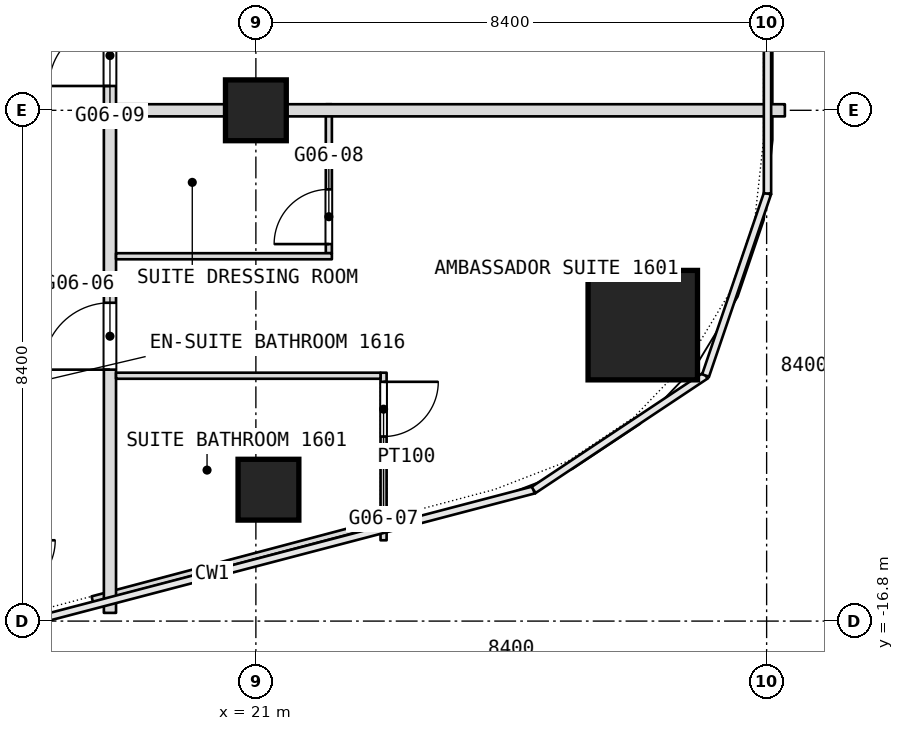
"""IFC4 building model, lengths in metres.
Left out: names, types, materials, properties, quantities, classifications, styles, units other than length and angle.
Written with IfcOpenShell. Run it as: python <this file> out.ifc"""

import sys

from ifc_helpers import new_model, si_unit, direction, frame, frame_2d, origin, origin_2d, place, context, subcontext, project, spatial, rectangle, extrude, element, fill, save


model = new_model("IFC4")
c1 = context("Model", 3, precision=1e-05, world=origin(), true_north=direction((0.0, 1.0)))
c2 = subcontext(c1, "Body", "Model", "MODEL_VIEW")
j1 = project(units=[si_unit("LENGTHUNIT", "METRE"), si_unit("PLANEANGLEUNIT", "RADIAN")], contexts=[c1])
p1 = place(None, origin())
s1 = spatial("IfcSite", under=j1, at=p1, CompositionType="ELEMENT")
p2 = place(p1, origin())
s2 = spatial("IfcBuilding", under=s1, at=p2, CompositionType="ELEMENT")
p3 = place(p2, frame((0.0, 0.0, 72.5)))
s3 = spatial("IfcBuildingStorey", under=s2, at=p3, CompositionType="ELEMENT", Elevation=72.5)
p4 = place(p3, frame((27.363, -11.933, 0.0), z_axis=(0.0, 0.0, 1.0), x_axis=(1.0, 0.0, 0.0)))
e1 = element("IfcColumn", 1, at=p4, inside=s3, PredefinedType="COLUMN", context=c2, shape_type="SweptSolid", body=[
    extrude(rectangle(XDim=1.8, YDim=1.8, at=origin_2d()), origin(), (0.0, 0.0, 1.0), 3.6),
])
for number, where, z_axis, x_axis in (
    (2, (21.0, -8.4, 0.0), (0.0, 0.0, 1.0), (1.0, 0.0, 0.0)),
    (3, (21.207, -14.639, 0.0), (0.0, 0.0, 1.0), (1.0, 0.0, 0.0)),
):
    element("IfcColumn", number, at=place(p3, frame(where, z_axis=z_axis, x_axis=x_axis)), inside=s3, PredefinedType="COLUMN", context=c2, shape_type="SweptSolid", body=[
        extrude(rectangle(XDim=1.0, YDim=1.0, at=origin_2d()), origin(), (0.0, 0.0, 1.0), 3.6),
    ])
p5 = place(p3, frame((23.1, -15.471, 0.0), z_axis=(0.0, 0.0, 1.0), x_axis=(0.0, 1.0, 0.0)))
e4 = element("IfcWall", 4, at=p5, inside=s3, PredefinedType="PARTITIONING", context=c2, shape_type="SweptSolid", body=[
    extrude(rectangle(XDim=2.756, YDim=0.1, at=frame_2d((1.378, 0.0))), origin(), (0.0, 0.0, 1.0), 3.34),
])
p6 = place(p5, frame((1.706, 0.0, 0.0)))
e5 = element("IfcOpeningElement", 5, at=p6, cuts=e4, PredefinedType="OPENING", context=c2, shape_type="SweptSolid", body=[
    extrude(rectangle(XDim=0.9, YDim=2.1, at=frame_2d((0.45, 1.05))), frame((0.0, 0.05, 0.0), z_axis=(0.0, -1.0, 0.0), x_axis=(1.0, 0.0, 0.0)), (0.0, 0.0, 1.0), 0.1),
])
p7 = place(p3, frame((22.2, -10.75, 0.0), z_axis=(0.0, 0.0, 1.0), x_axis=(0.0, 1.0, 0.0)))
e6 = element("IfcWall", 6, at=p7, inside=s3, PredefinedType="PARTITIONING", context=c2, shape_type="SweptSolid", body=[
    extrude(rectangle(XDim=2.45, YDim=0.1, at=frame_2d((1.225, 0.0))), origin(), (0.0, 0.0, 1.0), 3.34),
])
p8 = place(p7, frame((0.15, 0.0, 0.0)))
e7 = element("IfcOpeningElement", 7, at=p8, cuts=e6, PredefinedType="OPENING", context=c2, shape_type="SweptSolid", body=[
    extrude(rectangle(XDim=0.9, YDim=2.1, at=frame_2d((0.45, 1.05))), frame((0.0, 0.05, 0.0), z_axis=(0.0, -1.0, 0.0), x_axis=(1.0, 0.0, 0.0)), (0.0, 0.0, 1.0), 0.1),
])
p9 = place(p3, frame((18.31, -16.442, 0.0), z_axis=(0.0, 0.0, 1.0), x_axis=(0.966552628131, 0.256468354876, 0.0)))
e8 = element("IfcWall", 8, at=p9, inside=s3, PredefinedType="PARTITIONING", context=c2, shape_type="SweptSolid", body=[
    extrude(rectangle(XDim=5.256, YDim=0.1, at=frame_2d((2.628, 0.0))), origin(), (0.0, 0.0, 1.0), 3.34),
])
p10 = place(p3, frame((18.6, -16.665, 0.0), z_axis=(0.0, 0.0, 1.0), x_axis=(0.0, 1.0, 0.0)))
e9 = element("IfcWall", 9, at=p10, inside=s3, PredefinedType="PARTITIONING", context=c2, shape_type="SweptSolid", body=[
    extrude(rectangle(XDim=50.205, YDim=0.2, at=frame_2d((25.103, 0.0))), origin(), (0.0, 0.0, 1.0), 3.34),
])
p11 = place(p10, frame((4.0, 0.0, 0.0)))
e10 = element("IfcOpeningElement", 10, at=p11, cuts=e9, PredefinedType="OPENING", context=c2, shape_type="SweptSolid", body=[
    extrude(rectangle(XDim=1.1, YDim=2.1, at=frame_2d((0.55, 1.05))), frame((0.0, 0.1, 0.0), z_axis=(0.0, -1.0, 0.0), x_axis=(1.0, 0.0, 0.0)), (0.0, 0.0, 1.0), 0.2),
])
p12 = place(p10, frame((8.665, 0.0, 0.0)))
e11 = element("IfcOpeningElement", 11, at=p12, cuts=e9, PredefinedType="OPENING", context=c2, shape_type="SweptSolid", body=[
    extrude(rectangle(XDim=1.0, YDim=2.1, at=frame_2d((0.5, 1.05))), frame((0.0, 0.1, 0.0), z_axis=(0.0, -1.0, 0.0), x_axis=(1.0, 0.0, 0.0)), (0.0, 0.0, 1.0), 0.2),
])
p13 = place(p10, frame((15.265, 0.0, 0.0)))
e12 = element("IfcOpeningElement", 12, at=p13, cuts=e9, PredefinedType="OPENING", context=c2, shape_type="SweptSolid", body=[
    extrude(rectangle(XDim=1.0, YDim=2.1, at=frame_2d((0.5, 1.05))), frame((0.0, 0.1, 0.0), z_axis=(0.0, -1.0, 0.0), x_axis=(1.0, 0.0, 0.0)), (0.0, 0.0, 1.0), 0.2),
])
p14 = place(p10, frame((19.965, 0.0, 0.0)))
e13 = element("IfcOpeningElement", 13, at=p14, cuts=e9, PredefinedType="OPENING", context=c2, shape_type="SweptSolid", body=[
    extrude(rectangle(XDim=1.8, YDim=2.1, at=frame_2d((0.9, 1.05))), frame((0.0, 0.1, 0.0), z_axis=(0.0, -1.0, 0.0), x_axis=(1.0, 0.0, 0.0)), (0.0, 0.0, 1.0), 0.2),
])
p15 = place(p10, frame((28.665, 0.0, 0.0)))
e14 = element("IfcOpeningElement", 14, at=p15, cuts=e9, PredefinedType="OPENING", context=c2, shape_type="SweptSolid", body=[
    extrude(rectangle(XDim=1.1, YDim=2.1, at=frame_2d((0.55, 1.05))), frame((0.0, 0.1, 0.0), z_axis=(0.0, -1.0, 0.0), x_axis=(1.0, 0.0, 0.0)), (0.0, 0.0, 1.0), 0.2),
])
p16 = place(p10, frame((39.215, 0.0, 0.0)))
e15 = element("IfcOpeningElement", 15, at=p16, cuts=e9, PredefinedType="OPENING", context=c2, shape_type="SweptSolid", body=[
    extrude(rectangle(XDim=1.1, YDim=2.1, at=frame_2d((0.55, 1.05))), frame((0.0, 0.1, 0.0), z_axis=(0.0, -1.0, 0.0), x_axis=(1.0, 0.0, 0.0)), (0.0, 0.0, 1.0), 0.2),
])
p17 = place(p10, frame((45.165, 0.0, 0.0)))
e16 = element("IfcOpeningElement", 16, at=p17, cuts=e9, PredefinedType="OPENING", context=c2, shape_type="SweptSolid", body=[
    extrude(rectangle(XDim=1.8, YDim=2.1, at=frame_2d((0.9, 1.05))), frame((0.0, 0.1, 0.0), z_axis=(0.0, -1.0, 0.0), x_axis=(1.0, 0.0, 0.0)), (0.0, 0.0, 1.0), 0.2),
])
p18 = place(p3, frame((18.7, -12.765, 0.0), z_axis=(0.0, 0.0, 1.0), x_axis=(1.0, 0.0, 0.0)))
e17 = element("IfcWall", 17, at=p18, inside=s3, PredefinedType="PARTITIONING", context=c2, shape_type="SweptSolid", body=[
    extrude(rectangle(XDim=4.35, YDim=0.1, at=frame_2d((2.175, 0.0))), origin(), (0.0, 0.0, 1.0), 3.34),
])
p19 = place(p3, frame((18.7, -10.8, 0.0), z_axis=(0.0, 0.0, 1.0), x_axis=(1.0, 0.0, 0.0)))
e18 = element("IfcWall", 18, at=p19, inside=s3, PredefinedType="PARTITIONING", context=c2, shape_type="SweptSolid", body=[
    extrude(rectangle(XDim=3.55, YDim=0.1, at=frame_2d((1.775, 0.0))), origin(), (0.0, 0.0, 1.0), 3.34),
])
p20 = place(p3, frame((18.7, -8.4, 0.0), z_axis=(0.0, 0.0, 1.0), x_axis=(1.0, 0.0, 0.0)))
e19 = element("IfcWall", 19, at=p20, inside=s3, PredefinedType="PARTITIONING", context=c2, shape_type="SweptSolid", body=[
    extrude(rectangle(XDim=11.0, YDim=0.2, at=frame_2d((5.5, 0.0))), origin(), (0.0, 0.0, 1.0), 2.84),
])
p21 = place(p6, origin())
e20 = element("IfcDoor", 20, at=p21, inside=s3, OperationType="SINGLE_SWING_RIGHT", PredefinedType="DOOR", context=c2, shape_type="SweptSolid", body=[
    extrude(rectangle(XDim=0.9, YDim=2.1, at=frame_2d((0.45, 1.05))), frame((0.0, 0.025, 0.0), z_axis=(0.0, -1.0, 0.0), x_axis=(1.0, 0.0, 0.0)), (0.0, 0.0, 1.0), 0.05),
])
fill(e5, e20)
p22 = place(p8, origin())
e21 = element("IfcDoor", 21, at=p22, inside=s3, OperationType="SINGLE_SWING_LEFT", PredefinedType="DOOR", context=c2, shape_type="SweptSolid", body=[
    extrude(rectangle(XDim=0.9, YDim=2.1, at=frame_2d((0.45, 1.05))), frame((0.0, 0.025, 0.0), z_axis=(0.0, -1.0, 0.0), x_axis=(1.0, 0.0, 0.0)), (0.0, 0.0, 1.0), 0.05),
])
fill(e7, e21)
p23 = place(p11, origin())
e22 = element("IfcDoor", 22, at=p23, inside=s3, OperationType="SINGLE_SWING_RIGHT", PredefinedType="DOOR", context=c2, shape_type="SweptSolid", body=[
    extrude(rectangle(XDim=1.1, YDim=2.1, at=frame_2d((0.55, 1.05))), frame((0.0, 0.025, 0.0), z_axis=(0.0, -1.0, 0.0), x_axis=(1.0, 0.0, 0.0)), (0.0, 0.0, 1.0), 0.05),
])
fill(e10, e22)
p24 = place(p12, origin())
e23 = element("IfcDoor", 23, at=p24, inside=s3, OperationType="SINGLE_SWING_LEFT", PredefinedType="DOOR", context=c2, shape_type="SweptSolid", body=[
    extrude(rectangle(XDim=1.0, YDim=2.1, at=frame_2d((0.5, 1.05))), frame((0.0, 0.025, 0.0), z_axis=(0.0, -1.0, 0.0), x_axis=(1.0, 0.0, 0.0)), (0.0, 0.0, 1.0), 0.05),
])
fill(e11, e23)
save(model, sys.argv[1])
